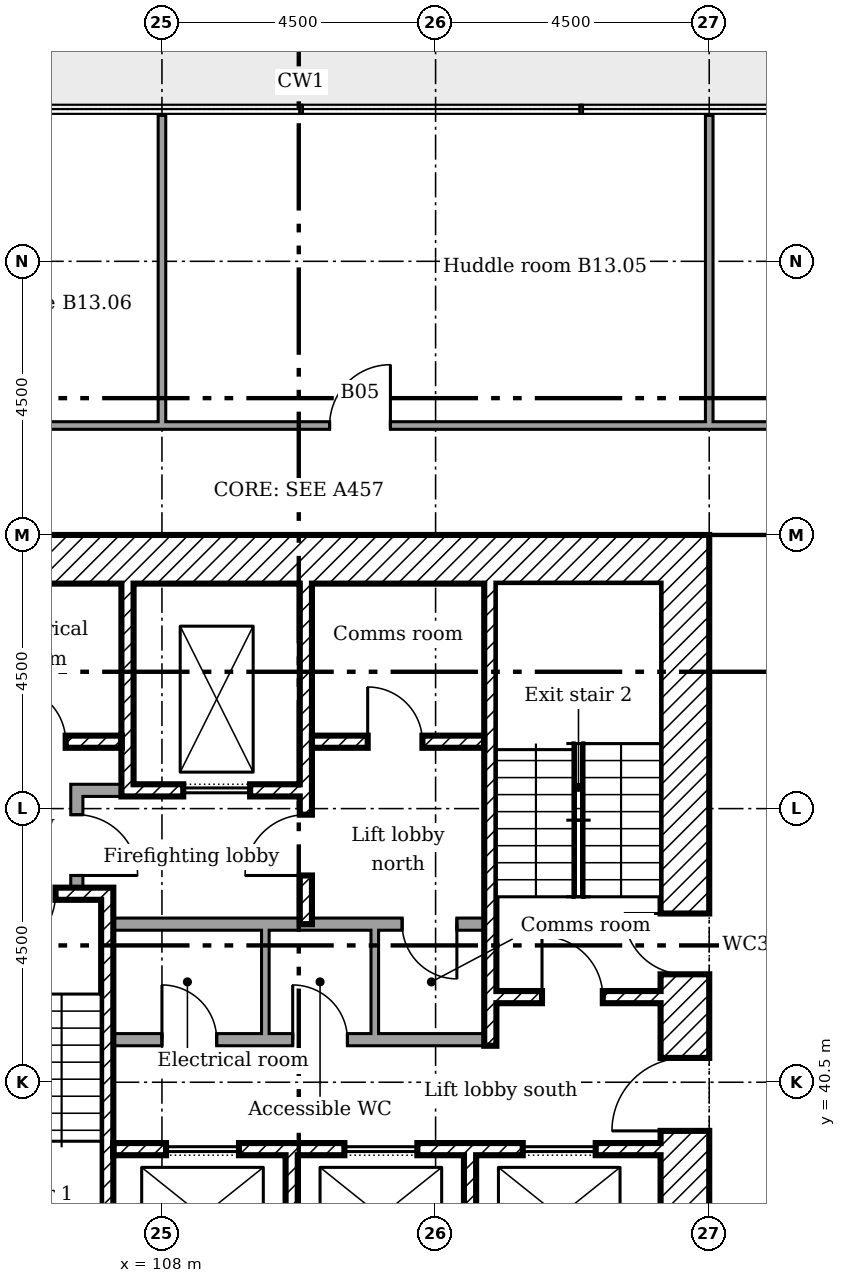
"""IFC4 building model, lengths in metres.
Left out: names, types, materials, properties, quantities, classifications, styles, units other than length and angle.
Written with IfcOpenShell. Run it as: python <this file> out.ifc"""

import sys

from ifc_helpers import new_model, si_unit, direction, frame, frame_2d, origin, place, context, subcontext, project, spatial, rectangle, extrude, element, fill, save


model = new_model("IFC4")
c1 = context("Model", 3, precision=1e-05, world=origin(), true_north=direction((0.0, 1.0)))
c2 = subcontext(c1, "Body", "Model", "MODEL_VIEW")
j1 = project(units=[si_unit("LENGTHUNIT", "METRE"), si_unit("PLANEANGLEUNIT", "RADIAN")], contexts=[c1])
p1 = place(None, origin())
s1 = spatial("IfcSite", under=j1, at=p1, CompositionType="ELEMENT")
p2 = place(p1, origin())
s2 = spatial("IfcBuilding", under=s1, at=p2, CompositionType="ELEMENT")
p3 = place(p2, frame((0.0, 0.0, 58.2)))
s3 = spatial("IfcBuildingStorey", under=s2, at=p3, CompositionType="ELEMENT", Elevation=58.2)
p4 = place(p3, frame((116.6, 36.0, 0.0), z_axis=(0.0, 0.0, 1.0), x_axis=(0.0, 1.0, 0.0)))
e1 = element("IfcWall", 1, at=p4, inside=s3, PredefinedType="SHEAR", context=c2, shape_type="SweptSolid", body=[
    extrude(rectangle(XDim=13.5, YDim=0.8, at=frame_2d((6.75, 0.0))), origin(), (0.0, 0.0, 1.0), 3.35),
])
p5 = place(p4, frame((3.7, 0.0, 0.0)))
e2 = element("IfcOpeningElement", 2, at=p5, cuts=e1, PredefinedType="OPENING", context=c2, shape_type="SweptSolid", body=[
    extrude(rectangle(XDim=1.2, YDim=2.1, at=frame_2d((0.6, 1.05))), frame((0.0, 0.41, 0.0), z_axis=(0.0, -1.0, 0.0), x_axis=(1.0, 0.0, 0.0)), (0.0, 0.0, 1.0), 0.82),
])
p6 = place(p4, frame((6.275, 0.0, 0.0)))
e3 = element("IfcOpeningElement", 3, at=p6, cuts=e1, PredefinedType="OPENING", context=c2, shape_type="SweptSolid", body=[
    extrude(rectangle(XDim=1.0, YDim=2.1, at=frame_2d((0.5, 1.05))), frame((0.0, 0.41, 0.0), z_axis=(0.0, -1.0, 0.0), x_axis=(1.0, 0.0, 0.0)), (0.0, 0.0, 1.0), 0.82),
])
p7 = place(p3, frame((104.3, 49.1, 0.0)))
e4 = element("IfcWall", 4, at=p7, inside=s3, PredefinedType="SHEAR", context=c2, shape_type="SweptSolid", body=[
    extrude(rectangle(XDim=11.9, YDim=0.8, at=frame_2d((5.95, 0.0))), origin(), (0.0, 0.0, 1.0), 3.35),
])
p8 = place(p3, frame((107.433, 48.7, 0.0), z_axis=(0.0, 0.0, 1.0), x_axis=(0.0, -1.0, 0.0)))
e5 = element("IfcWall", 5, at=p8, inside=s3, PredefinedType="SHEAR", context=c2, shape_type="SweptSolid", body=[
    extrude(rectangle(XDim=3.5, YDim=0.2, at=frame_2d((1.75, 0.0))), origin(), (0.0, 0.0, 1.0), 3.35),
])
p9 = place(p3, frame((110.367, 48.7, 0.0), z_axis=(0.0, 0.0, 1.0), x_axis=(0.0, -1.0, 0.0)))
e6 = element("IfcWall", 6, at=p9, inside=s3, PredefinedType="SHEAR", context=c2, shape_type="SweptSolid", body=[
    extrude(rectangle(XDim=5.6, YDim=0.2, at=frame_2d((2.8, 0.0))), origin(), (0.0, 0.0, 1.0), 3.35),
])
p10 = place(p9, frame((3.8, 0.0, 0.0)))
e7 = element("IfcOpeningElement", 7, at=p10, cuts=e6, PredefinedType="OPENING", context=c2, shape_type="SweptSolid", body=[
    extrude(rectangle(XDim=1.0, YDim=2.1, at=frame_2d((0.5, 1.05))), frame((0.0, 0.11, 0.0), z_axis=(0.0, -1.0, 0.0), x_axis=(1.0, 0.0, 0.0)), (0.0, 0.0, 1.0), 0.22),
])
for number, where, z_axis, x_axis in (
    (8, (110.133, 36.8, 0.0), (0.0, 0.0, 1.0), (0.0, 1.0, 0.0)),
    (9, (113.067, 36.8, 0.0), (0.0, 0.0, 1.0), (0.0, 1.0, 0.0)),
):
    element("IfcWall", number, at=place(p3, frame(where, z_axis=z_axis, x_axis=x_axis)), inside=s3, PredefinedType="SHEAR", context=c2, shape_type="SweptSolid", body=[
        extrude(rectangle(XDim=2.5, YDim=0.2, at=frame_2d((1.25, 0.0))), origin(), (0.0, 0.0, 1.0), 3.35),
    ])
p11 = place(p3, frame((106.5, 45.3, 0.0)))
e10 = element("IfcWall", 10, at=p11, inside=s3, PredefinedType="PARTITIONING", context=c2, shape_type="SweptSolid", body=[
    extrude(rectangle(XDim=0.833, YDim=0.2, at=frame_2d((0.417, 0.0))), origin(), (0.0, 0.0, 1.0), 3.35),
])
p12 = place(p3, frame((106.6, 43.7, 0.0), z_axis=(0.0, 0.0, 1.0), x_axis=(0.0, 1.0, 0.0)))
e11 = element("IfcWall", 11, at=p12, inside=s3, PredefinedType="PARTITIONING", context=c2, shape_type="SweptSolid", body=[
    extrude(rectangle(XDim=1.5, YDim=0.2, at=frame_2d((0.75, 0.0))), origin(), (0.0, 0.0, 1.0), 3.35),
])
p13 = place(p12, frame((0.2, 0.0, 0.0)))
e12 = element("IfcOpeningElement", 12, at=p13, cuts=e11, PredefinedType="OPENING", context=c2, shape_type="SweptSolid", body=[
    extrude(rectangle(XDim=1.0, YDim=2.1, at=frame_2d((0.5, 1.05))), frame((0.0, 0.11, 0.0), z_axis=(0.0, -1.0, 0.0), x_axis=(1.0, 0.0, 0.0)), (0.0, 0.0, 1.0), 0.22),
])
p14 = place(p3, frame((104.3, 46.1, 0.0)))
e13 = element("IfcWall", 13, at=p14, inside=s3, PredefinedType="SHEAR", context=c2, shape_type="SweptSolid", body=[
    extrude(rectangle(XDim=3.033, YDim=0.2, at=frame_2d((1.517, 0.0))), origin(), (0.0, 0.0, 1.0), 3.35),
])
p15 = place(p14, frame((1.217, 0.0, 0.0)))
e14 = element("IfcOpeningElement", 14, at=p15, cuts=e13, PredefinedType="OPENING", context=c2, shape_type="SweptSolid", body=[
    extrude(rectangle(XDim=0.9, YDim=2.1, at=frame_2d((0.45, 1.05))), frame((0.0, 0.11, 0.0), z_axis=(0.0, -1.0, 0.0), x_axis=(1.0, 0.0, 0.0)), (0.0, 0.0, 1.0), 0.22),
])
p16 = place(p3, frame((110.467, 46.1, 0.0)))
e15 = element("IfcWall", 15, at=p16, inside=s3, PredefinedType="SHEAR", context=c2, shape_type="SweptSolid", body=[
    extrude(rectangle(XDim=2.833, YDim=0.2, at=frame_2d((1.417, 0.0))), origin(), (0.0, 0.0, 1.0), 3.35),
])
p17 = place(p16, frame((0.917, 0.0, 0.0)))
e16 = element("IfcOpeningElement", 16, at=p17, cuts=e15, PredefinedType="OPENING", context=c2, shape_type="SweptSolid", body=[
    extrude(rectangle(XDim=0.9, YDim=2.1, at=frame_2d((0.45, 1.05))), frame((0.0, 0.11, 0.0), z_axis=(0.0, -1.0, 0.0), x_axis=(1.0, 0.0, 0.0)), (0.0, 0.0, 1.0), 0.22),
])
p18 = place(p3, frame((107.533, 45.3, 0.0)))
e17 = element("IfcWall", 17, at=p18, inside=s3, PredefinedType="SHEAR", context=c2, shape_type="SweptSolid", body=[
    extrude(rectangle(XDim=2.733, YDim=0.2, at=frame_2d((1.367, 0.0))), origin(), (0.0, 0.0, 1.0), 3.35),
])
p19 = place(p18, frame((0.817, 0.0, 0.0)))
e18 = element("IfcOpeningElement", 18, at=p19, cuts=e17, PredefinedType="OPENING", context=c2, shape_type="SweptSolid", body=[
    extrude(rectangle(XDim=1.1, YDim=2.1, at=frame_2d((0.55, 1.05))), frame((0.0, 0.11, 0.0), z_axis=(0.0, -1.0, 0.0), x_axis=(1.0, 0.0, 0.0)), (0.0, 0.0, 1.0), 0.22),
])
p20 = place(p3, frame((107.2, 39.4, 0.0)))
e19 = element("IfcWall", 19, at=p20, inside=s3, PredefinedType="SHEAR", context=c2, shape_type="SweptSolid", body=[
    extrude(rectangle(XDim=9.0, YDim=0.2, at=frame_2d((4.5, 0.0))), origin(), (0.0, 0.0, 1.0), 3.35),
])
p21 = place(p20, frame((0.867, 0.0, 0.0)))
e20 = element("IfcOpeningElement", 20, at=p21, cuts=e19, PredefinedType="OPENING", context=c2, shape_type="SweptSolid", body=[
    extrude(rectangle(XDim=1.2, YDim=2.1, at=frame_2d((0.6, 1.05))), frame((0.0, 0.11, 0.0), z_axis=(0.0, -1.0, 0.0), x_axis=(1.0, 0.0, 0.0)), (0.0, 0.0, 1.0), 0.22),
])
p22 = place(p20, frame((3.8, 0.0, 0.0)))
e21 = element("IfcOpeningElement", 21, at=p22, cuts=e19, PredefinedType="OPENING", context=c2, shape_type="SweptSolid", body=[
    extrude(rectangle(XDim=1.2, YDim=2.1, at=frame_2d((0.6, 1.05))), frame((0.0, 0.11, 0.0), z_axis=(0.0, -1.0, 0.0), x_axis=(1.0, 0.0, 0.0)), (0.0, 0.0, 1.0), 0.22),
])
p23 = place(p20, frame((6.733, 0.0, 0.0)))
e22 = element("IfcOpeningElement", 22, at=p23, cuts=e19, PredefinedType="OPENING", context=c2, shape_type="SweptSolid", body=[
    extrude(rectangle(XDim=1.2, YDim=2.1, at=frame_2d((0.6, 1.05))), frame((0.0, 0.11, 0.0), z_axis=(0.0, -1.0, 0.0), x_axis=(1.0, 0.0, 0.0)), (0.0, 0.0, 1.0), 0.22),
])
p24 = place(p3, frame((107.1, 36.8, 0.0), z_axis=(0.0, 0.0, 1.0), x_axis=(0.0, 1.0, 0.0)))
e23 = element("IfcWall", 23, at=p24, inside=s3, PredefinedType="SHEAR", context=c2, shape_type="SweptSolid", body=[
    extrude(rectangle(XDim=6.9, YDim=0.2, at=frame_2d((3.45, 0.0))), origin(), (0.0, 0.0, 1.0), 3.35),
])
p25 = place(p3, frame((104.3, 43.6, 0.0)))
e24 = element("IfcWall", 24, at=p25, inside=s3, PredefinedType="SHEAR", context=c2, shape_type="SweptSolid", body=[
    extrude(rectangle(XDim=2.7, YDim=0.2, at=frame_2d((1.35, 0.0))), origin(), (0.0, 0.0, 1.0), 3.35),
])
p26 = place(p25, frame((0.95, 0.0, 0.0)))
e25 = element("IfcOpeningElement", 25, at=p26, cuts=e24, PredefinedType="OPENING", context=c2, shape_type="SweptSolid", body=[
    extrude(rectangle(XDim=1.0, YDim=2.1, at=frame_2d((0.5, 1.05))), frame((0.0, 0.11, 0.0), z_axis=(0.0, -1.0, 0.0), x_axis=(1.0, 0.0, 0.0)), (0.0, 0.0, 1.0), 0.22),
])
p27 = place(p3, frame((113.5, 41.9, 0.0)))
e26 = element("IfcWall", 26, at=p27, inside=s3, PredefinedType="SHEAR", context=c2, shape_type="SweptSolid", body=[
    extrude(rectangle(XDim=2.7, YDim=0.2, at=frame_2d((1.35, 0.0))), origin(), (0.0, 0.0, 1.0), 3.35),
])
p28 = place(p27, frame((0.75, 0.0, 0.0)))
e27 = element("IfcOpeningElement", 27, at=p28, cuts=e26, PredefinedType="OPENING", context=c2, shape_type="SweptSolid", body=[
    extrude(rectangle(XDim=1.0, YDim=2.1, at=frame_2d((0.5, 1.05))), frame((0.0, 0.11, 0.0), z_axis=(0.0, -1.0, 0.0), x_axis=(1.0, 0.0, 0.0)), (0.0, 0.0, 1.0), 0.22),
])
p29 = place(p3, frame((113.4, 41.1, 0.0), z_axis=(0.0, 0.0, 1.0), x_axis=(0.0, 1.0, 0.0)))
e28 = element("IfcWall", 28, at=p29, inside=s3, PredefinedType="SHEAR", context=c2, shape_type="SweptSolid", body=[
    extrude(rectangle(XDim=7.6, YDim=0.2, at=frame_2d((3.8, 0.0))), origin(), (0.0, 0.0, 1.0), 3.35),
])
p30 = place(p3, frame((107.2, 43.1, 0.0)))
e29 = element("IfcWall", 29, at=p30, inside=s3, PredefinedType="PARTITIONING", context=c2, shape_type="SweptSolid", body=[
    extrude(rectangle(XDim=6.1, YDim=0.2, at=frame_2d((3.05, 0.0))), origin(), (0.0, 0.0, 1.0), 3.35),
])
p31 = place(p30, frame((4.75, 0.0, 0.0)))
e30 = element("IfcOpeningElement", 30, at=p31, cuts=e29, PredefinedType="OPENING", context=c2, shape_type="SweptSolid", body=[
    extrude(rectangle(XDim=0.9, YDim=2.1, at=frame_2d((0.45, 1.05))), frame((0.0, 0.11, 0.0), z_axis=(0.0, -1.0, 0.0), x_axis=(1.0, 0.0, 0.0)), (0.0, 0.0, 1.0), 0.22),
])
p32 = place(p3, frame((107.2, 41.2, 0.0)))
e31 = element("IfcWall", 31, at=p32, inside=s3, PredefinedType="PARTITIONING", context=c2, shape_type="SweptSolid", body=[
    extrude(rectangle(XDim=6.1, YDim=0.2, at=frame_2d((3.05, 0.0))), origin(), (0.0, 0.0, 1.0), 3.35),
])
p33 = place(p32, frame((0.8, 0.0, 0.0)))
e32 = element("IfcOpeningElement", 32, at=p33, cuts=e31, PredefinedType="OPENING", context=c2, shape_type="SweptSolid", body=[
    extrude(rectangle(XDim=0.9, YDim=2.1, at=frame_2d((0.45, 1.05))), frame((0.0, 0.11, 0.0), z_axis=(0.0, -1.0, 0.0), x_axis=(1.0, 0.0, 0.0)), (0.0, 0.0, 1.0), 0.22),
])
p34 = place(p32, frame((2.95, 0.0, 0.0)))
e33 = element("IfcOpeningElement", 33, at=p34, cuts=e31, PredefinedType="OPENING", context=c2, shape_type="SweptSolid", body=[
    extrude(rectangle(XDim=0.9, YDim=2.1, at=frame_2d((0.45, 1.05))), frame((0.0, 0.11, 0.0), z_axis=(0.0, -1.0, 0.0), x_axis=(1.0, 0.0, 0.0)), (0.0, 0.0, 1.0), 0.22),
])
for number, where, z_axis, x_axis in (
    (34, (109.7, 41.3, 0.0), (0.0, 0.0, 1.0), (0.0, 1.0, 0.0)),
    (35, (111.5, 41.3, 0.0), (0.0, 0.0, 1.0), (0.0, 1.0, 0.0)),
):
    element("IfcWall", number, at=place(p3, frame(where, z_axis=z_axis, x_axis=x_axis)), inside=s3, PredefinedType="PARTITIONING", context=c2, shape_type="SweptSolid", body=[
        extrude(rectangle(XDim=1.7, YDim=0.125, at=frame_2d((0.85, 0.0))), origin(), (0.0, 0.0, 1.0), 3.35),
    ])
p35 = place(p3, frame((100.137, 51.3, 0.0)))
e36 = element("IfcWall", 36, at=p35, inside=s3, PredefinedType="PARTITIONING", context=c2, shape_type="SweptSolid", body=[
    extrude(rectangle(XDim=19.325, YDim=0.125, at=frame_2d((9.663, 0.0))), origin(), (0.0, 0.0, 1.0), 3.45),
])
p36 = place(p35, frame((10.619, 0.0, 0.0)))
e37 = element("IfcOpeningElement", 37, at=p36, cuts=e36, PredefinedType="OPENING", context=c2, shape_type="SweptSolid", body=[
    extrude(rectangle(XDim=1.0, YDim=2.1, at=frame_2d((0.5, 1.05))), frame((0.0, 0.073, 0.0), z_axis=(0.0, -1.0, 0.0), x_axis=(1.0, 0.0, 0.0)), (0.0, 0.0, 1.0), 0.145),
])
p37 = place(p35, frame((4.69, 0.0, 0.0)))
e38 = element("IfcOpeningElement", 38, at=p37, cuts=e36, PredefinedType="OPENING", context=c2, shape_type="SweptSolid", body=[
    extrude(rectangle(XDim=1.0, YDim=2.1, at=frame_2d((0.5, 1.05))), frame((0.0, 0.073, 0.0), z_axis=(0.0, -1.0, 0.0), x_axis=(1.0, 0.0, 0.0)), (0.0, 0.0, 1.0), 0.145),
])
for number, where, z_axis, x_axis in (
    (39, (108.0, 51.3, 0.0), (0.0, 0.0, 1.0), (0.0, 1.0, 0.0)),
    (40, (117.0, 51.3, 0.0), (0.0, 0.0, 1.0), (0.0, 1.0, 0.0)),
):
    element("IfcWall", number, at=place(p3, frame(where, z_axis=z_axis, x_axis=x_axis)), inside=s3, PredefinedType="PARTITIONING", context=c2, shape_type="SweptSolid", body=[
        extrude(rectangle(XDim=5.1, YDim=0.125, at=frame_2d((2.55, 0.0))), origin(), (0.0, 0.0, 1.0), 2.851),
    ])
p38 = place(p5, origin())
e41 = element("IfcDoor", 41, at=p38, inside=s3, OperationType="SINGLE_SWING_RIGHT", PredefinedType="DOOR", context=c2, shape_type="SweptSolid", body=[
    extrude(rectangle(XDim=1.2, YDim=2.1, at=frame_2d((0.6, 1.05))), frame((0.0, 0.025, 0.0), z_axis=(0.0, -1.0, 0.0), x_axis=(1.0, 0.0, 0.0)), (0.0, 0.0, 1.0), 0.05),
])
fill(e2, e41)
p39 = place(p26, frame((1.0, 0.0, 0.0), x_axis=(-1.0, 0.0, 0.0)))
e42 = element("IfcDoor", 42, at=p39, inside=s3, OperationType="SINGLE_SWING_LEFT", PredefinedType="DOOR", context=c2, shape_type="SweptSolid", body=[
    extrude(rectangle(XDim=1.0, YDim=2.1, at=frame_2d((0.5, 1.05))), frame((0.0, 0.025, 0.0), z_axis=(0.0, -1.0, 0.0), x_axis=(1.0, 0.0, 0.0)), (0.0, 0.0, 1.0), 0.05),
])
fill(e25, e42)
p40 = place(p28, origin())
e43 = element("IfcDoor", 43, at=p40, inside=s3, OperationType="SINGLE_SWING_RIGHT", PredefinedType="DOOR", context=c2, shape_type="SweptSolid", body=[
    extrude(rectangle(XDim=1.0, YDim=2.1, at=frame_2d((0.5, 1.05))), frame((0.0, 0.025, 0.0), z_axis=(0.0, -1.0, 0.0), x_axis=(1.0, 0.0, 0.0)), (0.0, 0.0, 1.0), 0.05),
])
fill(e27, e43)
p41 = place(p6, origin())
e44 = element("IfcDoor", 44, at=p41, inside=s3, OperationType="SINGLE_SWING_LEFT", PredefinedType="DOOR", context=c2, shape_type="SweptSolid", body=[
    extrude(rectangle(XDim=1.0, YDim=2.1, at=frame_2d((0.5, 1.05))), frame((0.0, 0.025, 0.0), z_axis=(0.0, -1.0, 0.0), x_axis=(1.0, 0.0, 0.0)), (0.0, 0.0, 1.0), 0.05),
])
fill(e3, e44)
p42 = place(p10, frame((1.0, 0.0, 0.0), x_axis=(-1.0, 0.0, 0.0)))
e45 = element("IfcDoor", 45, at=p42, inside=s3, OperationType="SINGLE_SWING_RIGHT", PredefinedType="DOOR", context=c2, shape_type="SweptSolid", body=[
    extrude(rectangle(XDim=1.0, YDim=2.1, at=frame_2d((0.5, 1.05))), frame((0.0, 0.025, 0.0), z_axis=(0.0, -1.0, 0.0), x_axis=(1.0, 0.0, 0.0)), (0.0, 0.0, 1.0), 0.05),
])
fill(e7, e45)
p43 = place(p13, frame((1.0, 0.0, 0.0), x_axis=(-1.0, 0.0, 0.0)))
e46 = element("IfcDoor", 46, at=p43, inside=s3, OperationType="SINGLE_SWING_LEFT", PredefinedType="DOOR", context=c2, shape_type="SweptSolid", body=[
    extrude(rectangle(XDim=1.0, YDim=2.1, at=frame_2d((0.5, 1.05))), frame((0.0, 0.025, 0.0), z_axis=(0.0, -1.0, 0.0), x_axis=(1.0, 0.0, 0.0)), (0.0, 0.0, 1.0), 0.05),
])
fill(e12, e46)
p44 = place(p15, origin())
e47 = element("IfcDoor", 47, at=p44, inside=s3, OperationType="SINGLE_SWING_RIGHT", PredefinedType="DOOR", context=c2, shape_type="SweptSolid", body=[
    extrude(rectangle(XDim=0.9, YDim=2.1, at=frame_2d((0.45, 1.05))), frame((0.0, 0.025, 0.0), z_axis=(0.0, -1.0, 0.0), x_axis=(1.0, 0.0, 0.0)), (0.0, 0.0, 1.0), 0.05),
])
fill(e14, e47)
p45 = place(p17, origin())
e48 = element("IfcDoor", 48, at=p45, inside=s3, OperationType="SINGLE_SWING_RIGHT", PredefinedType="DOOR", context=c2, shape_type="SweptSolid", body=[
    extrude(rectangle(XDim=0.9, YDim=2.1, at=frame_2d((0.45, 1.05))), frame((0.0, 0.025, 0.0), z_axis=(0.0, -1.0, 0.0), x_axis=(1.0, 0.0, 0.0)), (0.0, 0.0, 1.0), 0.05),
])
fill(e16, e48)
p46 = place(p33, origin())
e49 = element("IfcDoor", 49, at=p46, inside=s3, OperationType="SINGLE_SWING_RIGHT", PredefinedType="DOOR", context=c2, shape_type="SweptSolid", body=[
    extrude(rectangle(XDim=0.9, YDim=2.1, at=frame_2d((0.45, 1.05))), frame((0.0, 0.025, 0.0), z_axis=(0.0, -1.0, 0.0), x_axis=(1.0, 0.0, 0.0)), (0.0, 0.0, 1.0), 0.05),
])
fill(e32, e49)
p47 = place(p34, origin())
e50 = element("IfcDoor", 50, at=p47, inside=s3, OperationType="SINGLE_SWING_RIGHT", PredefinedType="DOOR", context=c2, shape_type="SweptSolid", body=[
    extrude(rectangle(XDim=0.9, YDim=2.1, at=frame_2d((0.45, 1.05))), frame((0.0, 0.025, 0.0), z_axis=(0.0, -1.0, 0.0), x_axis=(1.0, 0.0, 0.0)), (0.0, 0.0, 1.0), 0.05),
])
fill(e33, e50)
p48 = place(p31, frame((0.9, 0.0, 0.0), x_axis=(-1.0, 0.0, 0.0)))
e51 = element("IfcDoor", 51, at=p48, inside=s3, OperationType="SINGLE_SWING_RIGHT", PredefinedType="DOOR", context=c2, shape_type="SweptSolid", body=[
    extrude(rectangle(XDim=0.9, YDim=2.1, at=frame_2d((0.45, 1.05))), frame((0.0, 0.025, 0.0), z_axis=(0.0, -1.0, 0.0), x_axis=(1.0, 0.0, 0.0)), (0.0, 0.0, 1.0), 0.05),
])
fill(e30, e51)
p49 = place(p19, origin())
e52 = element("IfcDoor", 52, at=p49, inside=s3, OperationType="SLIDING_TO_LEFT", PredefinedType="DOOR", context=c2, shape_type="SweptSolid", body=[
    extrude(rectangle(XDim=1.1, YDim=2.1, at=frame_2d((0.55, 1.05))), frame((0.0, 0.025, 0.0), z_axis=(0.0, -1.0, 0.0), x_axis=(1.0, 0.0, 0.0)), (0.0, 0.0, 1.0), 0.05),
])
fill(e18, e52)
p50 = place(p21, origin())
e53 = element("IfcDoor", 53, at=p50, inside=s3, OperationType="SLIDING_TO_LEFT", PredefinedType="DOOR", context=c2, shape_type="SweptSolid", body=[
    extrude(rectangle(XDim=1.2, YDim=2.1, at=frame_2d((0.6, 1.05))), frame((0.0, 0.025, 0.0), z_axis=(0.0, -1.0, 0.0), x_axis=(1.0, 0.0, 0.0)), (0.0, 0.0, 1.0), 0.05),
])
fill(e20, e53)
p51 = place(p22, origin())
e54 = element("IfcDoor", 54, at=p51, inside=s3, OperationType="SLIDING_TO_LEFT", PredefinedType="DOOR", context=c2, shape_type="SweptSolid", body=[
    extrude(rectangle(XDim=1.2, YDim=2.1, at=frame_2d((0.6, 1.05))), frame((0.0, 0.025, 0.0), z_axis=(0.0, -1.0, 0.0), x_axis=(1.0, 0.0, 0.0)), (0.0, 0.0, 1.0), 0.05),
])
fill(e21, e54)
p52 = place(p23, origin())
e55 = element("IfcDoor", 55, at=p52, inside=s3, OperationType="SLIDING_TO_LEFT", PredefinedType="DOOR", context=c2, shape_type="SweptSolid", body=[
    extrude(rectangle(XDim=1.2, YDim=2.1, at=frame_2d((0.6, 1.05))), frame((0.0, 0.025, 0.0), z_axis=(0.0, -1.0, 0.0), x_axis=(1.0, 0.0, 0.0)), (0.0, 0.0, 1.0), 0.05),
])
fill(e22, e55)
p53 = place(p36, origin())
e56 = element("IfcDoor", 56, at=p53, inside=s3, OperationType="SINGLE_SWING_LEFT", PredefinedType="DOOR", context=c2, shape_type="SweptSolid", body=[
    extrude(rectangle(XDim=1.0, YDim=2.1, at=frame_2d((0.5, 1.05))), frame((0.0, 0.025, 0.0), z_axis=(0.0, -1.0, 0.0), x_axis=(1.0, 0.0, 0.0)), (0.0, 0.0, 1.0), 0.05),
])
fill(e37, e56)
save(model, sys.argv[1])
